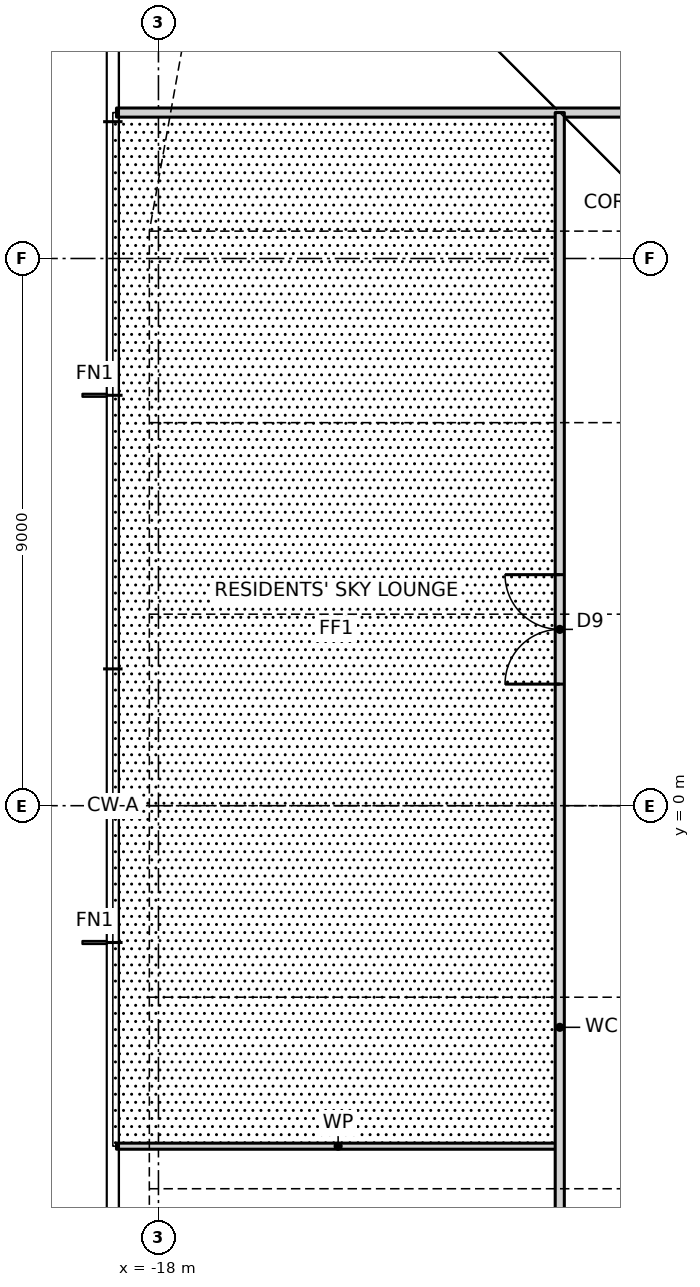
"""IFC4 building model, lengths in metres.
Left out: names, types, materials, properties, quantities, classifications, styles, units other than length and angle.
Written with IfcOpenShell. Run it as: python <this file> out.ifc"""

import sys

from ifc_helpers import new_model, si_unit, direction, frame, frame_2d, origin, place, context, subcontext, project, spatial, rectangle, extrude, element, fill, save


model = new_model("IFC4")
c1 = context("Model", 3, precision=1e-05, world=origin(), true_north=direction((0.0, 1.0)))
c2 = subcontext(c1, "Body", "Model", "MODEL_VIEW")
j1 = project(units=[si_unit("LENGTHUNIT", "METRE"), si_unit("PLANEANGLEUNIT", "RADIAN")], contexts=[c1])
p1 = place(None, origin())
s1 = spatial("IfcSite", under=j1, at=p1, CompositionType="ELEMENT")
p2 = place(p1, origin())
s2 = spatial("IfcBuilding", under=s1, at=p2, CompositionType="ELEMENT")
p3 = place(p2, frame((0.0, 0.0, 149.5)))
s3 = spatial("IfcBuildingStorey", under=s2, at=p3, CompositionType="ELEMENT", Elevation=149.5)
p4 = place(p3, frame((-18.69, -5.6, 0.0), z_axis=(0.0, 0.0, 1.0), x_axis=(1.0, 0.0, 0.0)))
e1 = element("IfcWall", 1, at=p4, inside=s3, PredefinedType="PARTITIONING", context=c2, shape_type="SweptSolid", body=[
    extrude(rectangle(XDim=7.29, YDim=0.1, at=frame_2d((3.645, 0.0))), origin(), (0.0, 0.0, 1.0), 3.27),
])
p5 = place(p3, frame((-18.69, 11.4, 0.0), z_axis=(0.0, 0.0, 1.0), x_axis=(1.0, 0.0, 0.0)))
e2 = element("IfcWall", 2, at=p5, inside=s3, PredefinedType="PARTITIONING", context=c2, shape_type="SweptSolid", body=[
    extrude(rectangle(XDim=30.09, YDim=0.15, at=frame_2d((15.045, 0.0))), origin(), (0.0, 0.0, 1.0), 3.27),
])
p6 = place(p5, frame((25.19, 0.0, 0.0)))
e3 = element("IfcOpeningElement", 3, at=p6, cuts=e2, PredefinedType="OPENING", context=c2, shape_type="SweptSolid", body=[
    extrude(rectangle(XDim=1.8, YDim=2.1, at=frame_2d((0.9, 1.05))), frame((0.0, 0.085, 0.0), z_axis=(0.0, -1.0, 0.0), x_axis=(1.0, 0.0, 0.0)), (0.0, 0.0, 1.0), 0.17),
])
p7 = place(p5, frame((17.19, 0.0, 0.0)))
e4 = element("IfcOpeningElement", 4, at=p7, cuts=e2, PredefinedType="OPENING", context=c2, shape_type="SweptSolid", body=[
    extrude(rectangle(XDim=1.8, YDim=2.1, at=frame_2d((0.9, 1.05))), frame((0.0, 0.085, 0.0), z_axis=(0.0, -1.0, 0.0), x_axis=(1.0, 0.0, 0.0)), (0.0, 0.0, 1.0), 0.17),
])
p8 = place(p5, frame((9.79, 0.0, 0.0)))
e5 = element("IfcOpeningElement", 5, at=p8, cuts=e2, PredefinedType="OPENING", context=c2, shape_type="SweptSolid", body=[
    extrude(rectangle(XDim=1.8, YDim=2.1, at=frame_2d((0.9, 1.05))), frame((0.0, 0.085, 0.0), z_axis=(0.0, -1.0, 0.0), x_axis=(1.0, 0.0, 0.0)), (0.0, 0.0, 1.0), 0.17),
])
p9 = place(p3, frame((-11.4, -18.69, 0.0), z_axis=(0.0, 0.0, 1.0), x_axis=(0.0, 1.0, 0.0)))
e6 = element("IfcWall", 6, at=p9, inside=s3, PredefinedType="PARTITIONING", context=c2, shape_type="SweptSolid", body=[
    extrude(rectangle(XDim=30.09, YDim=0.15, at=frame_2d((15.045, 0.0))), origin(), (0.0, 0.0, 1.0), 3.27),
])
p10 = place(p9, frame((20.69, 0.0, 0.0)))
e7 = element("IfcOpeningElement", 7, at=p10, cuts=e6, PredefinedType="OPENING", context=c2, shape_type="SweptSolid", body=[
    extrude(rectangle(XDim=1.8, YDim=2.1, at=frame_2d((0.9, 1.05))), frame((0.0, 0.085, 0.0), z_axis=(0.0, -1.0, 0.0), x_axis=(1.0, 0.0, 0.0)), (0.0, 0.0, 1.0), 0.17),
])
p11 = place(p9, frame((9.29, 0.0, 0.0)))
e8 = element("IfcOpeningElement", 8, at=p11, cuts=e6, PredefinedType="OPENING", context=c2, shape_type="SweptSolid", body=[
    extrude(rectangle(XDim=1.8, YDim=2.1, at=frame_2d((0.9, 1.05))), frame((0.0, 0.085, 0.0), z_axis=(0.0, -1.0, 0.0), x_axis=(1.0, 0.0, 0.0)), (0.0, 0.0, 1.0), 0.17),
])
p12 = place(p10, origin())
e9 = element("IfcDoor", 9, at=p12, inside=s3, OperationType="DOUBLE_DOOR_SINGLE_SWING", PredefinedType="DOOR", context=c2, shape_type="SweptSolid", body=[
    extrude(rectangle(XDim=1.8, YDim=2.1, at=frame_2d((0.9, 1.05))), frame((0.0, 0.025, 0.0), z_axis=(0.0, -1.0, 0.0), x_axis=(1.0, 0.0, 0.0)), (0.0, 0.0, 1.0), 0.05),
])
fill(e7, e9)
save(model, sys.argv[1])
